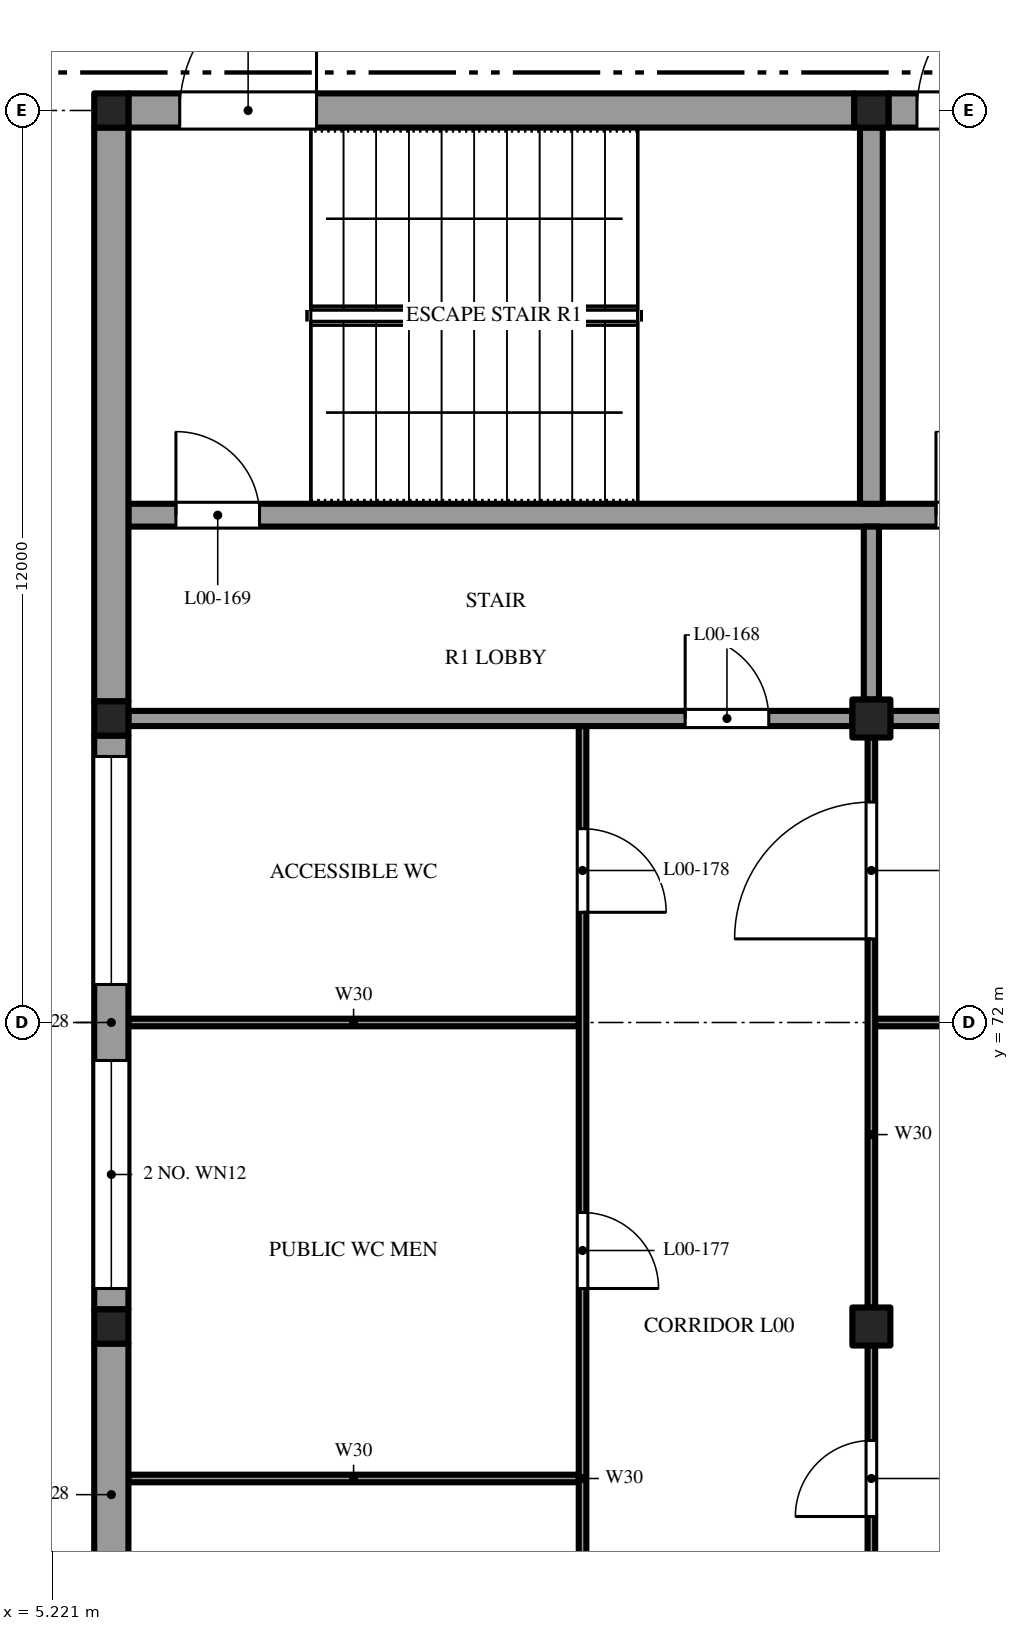
"""IFC4 building model, lengths in metres.
Left out: names, types, materials, properties, quantities, classifications, styles, units other than length and angle.
Written with IfcOpenShell. Run it as: python <this file> out.ifc"""

import sys

from ifc_helpers import new_model, si_unit, direction, frame, frame_2d, origin, origin_2d, place, context, subcontext, project, spatial, rectangle, extrude, element, fill, save


model = new_model("IFC4")
c1 = context("Model", 3, precision=1e-05, world=origin(), true_north=direction((0.0, 1.0)))
c2 = subcontext(c1, "Body", "Model", "MODEL_VIEW")
j1 = project(units=[si_unit("LENGTHUNIT", "METRE"), si_unit("PLANEANGLEUNIT", "RADIAN")], contexts=[c1])
p1 = place(None, origin())
s1 = spatial("IfcSite", under=j1, at=p1, CompositionType="ELEMENT")
p2 = place(p1, origin())
s2 = spatial("IfcBuilding", under=s1, at=p2, CompositionType="ELEMENT")
p3 = place(p2, origin())
s3 = spatial("IfcBuildingStorey", under=s2, at=p3, CompositionType="ELEMENT", Elevation=0.0)
for number, where, z_axis, x_axis in (
    (1, (6.0, 68.0, -0.4), (0.0, 0.0, 1.0), (1.0, 0.0, 0.0)),
    (2, (6.0, 76.0, -0.4), (0.0, 0.0, 1.0), (1.0, 0.0, 0.0)),
    (3, (6.0, 84.0, -0.4), (0.0, 0.0, 1.0), (1.0, 0.0, 0.0)),
):
    element("IfcColumn", number, at=place(p3, frame(where, z_axis=z_axis, x_axis=x_axis)), inside=s3, PredefinedType="COLUMN", context=c2, shape_type="SweptSolid", body=[
        extrude(rectangle(XDim=0.45, YDim=0.45, at=origin_2d()), origin(), (0.0, 0.0, 1.0), 7.6),
    ])
for number, where, z_axis, x_axis in (
    (4, (16.0, 68.0, -0.4), (0.0, 0.0, 1.0), (1.0, 0.0, 0.0)),
    (5, (16.0, 76.0, -0.4), (0.0, 0.0, 1.0), (1.0, 0.0, 0.0)),
):
    element("IfcColumn", number, at=place(p3, frame(where, z_axis=z_axis, x_axis=x_axis)), inside=s3, PredefinedType="COLUMN", context=c2, shape_type="SweptSolid", body=[
        extrude(rectangle(XDim=0.5, YDim=0.5, at=origin_2d()), origin(), (0.0, 0.0, 1.0), 7.6),
    ])
p4 = place(p3, frame((16.0, 84.0, -0.4), z_axis=(0.0, 0.0, 1.0), x_axis=(1.0, 0.0, 0.0)))
e6 = element("IfcColumn", 6, at=p4, inside=s3, PredefinedType="COLUMN", context=c2, shape_type="SweptSolid", body=[
    extrude(rectangle(XDim=0.45, YDim=0.45, at=origin_2d()), origin(), (0.0, 0.0, 1.0), 7.6),
])
for number, where, z_axis, x_axis in (
    (7, (6.225, 66.0, 0.0), (0.0, 0.0, 1.0), (1.0, 0.0, 0.0)),
    (8, (6.225, 72.0, 0.0), (0.0, 0.0, 1.0), (1.0, 0.0, 0.0)),
):
    element("IfcWall", number, at=place(p3, frame(where, z_axis=z_axis, x_axis=x_axis)), inside=s3, PredefinedType="PARTITIONING", context=c2, shape_type="SweptSolid", body=[
        extrude(rectangle(XDim=5.925, YDim=0.1, at=frame_2d((2.962, 0.0))), origin(), (0.0, 0.0, 1.0), 6.85),
    ])
p5 = place(p3, frame((16.05, 72.0, 0.0), z_axis=(0.0, 0.0, 1.0), x_axis=(1.0, 0.0, 0.0)))
e9 = element("IfcWall", 9, at=p5, inside=s3, PredefinedType="PARTITIONING", context=c2, shape_type="SweptSolid", body=[
    extrude(rectangle(XDim=29.725, YDim=0.1, at=frame_2d((14.862, 0.0))), origin(), (0.0, 0.0, 1.0), 6.85),
])
p6 = place(p5, frame((4.35, 0.0, 0.0)))
e10 = element("IfcOpeningElement", 10, at=p6, cuts=e9, PredefinedType="OPENING", context=c2, shape_type="SweptSolid", body=[
    extrude(rectangle(XDim=1.2, YDim=2.1, at=frame_2d((0.6, 1.05))), frame((0.0, 0.06, 0.0), z_axis=(0.0, -1.0, 0.0), x_axis=(1.0, 0.0, 0.0)), (0.0, 0.0, 1.0), 0.12),
])
p7 = place(p5, frame((17.55, 0.0, 0.0)))
e11 = element("IfcOpeningElement", 11, at=p7, cuts=e9, PredefinedType="OPENING", context=c2, shape_type="SweptSolid", body=[
    extrude(rectangle(XDim=1.8, YDim=2.1, at=frame_2d((0.9, 1.05))), frame((0.0, 0.06, 0.0), z_axis=(0.0, -1.0, 0.0), x_axis=(1.0, 0.0, 0.0)), (0.0, 0.0, 1.0), 0.12),
])
p8 = place(p3, frame((6.225, 76.0, 0.0), z_axis=(0.0, 0.0, 1.0), x_axis=(1.0, 0.0, 0.0)))
e12 = element("IfcWall", 12, at=p8, inside=s3, PredefinedType="SOLIDWALL", context=c2, shape_type="SweptSolid", body=[
    extrude(rectangle(XDim=9.525, YDim=0.2, at=frame_2d((4.762, 0.0))), origin(), (0.0, 0.0, 1.0), 6.85),
])
p9 = place(p8, frame((7.325, 0.0, 0.0)))
e13 = element("IfcOpeningElement", 13, at=p9, cuts=e12, PredefinedType="OPENING", context=c2, shape_type="SweptSolid", body=[
    extrude(rectangle(XDim=1.1, YDim=2.1, at=frame_2d((0.55, 1.05))), frame((0.0, 0.11, 0.0), z_axis=(0.0, -1.0, 0.0), x_axis=(1.0, 0.0, 0.0)), (0.0, 0.0, 1.0), 0.22),
])
p10 = place(p3, frame((16.25, 76.0, 0.0), z_axis=(0.0, 0.0, 1.0), x_axis=(1.0, 0.0, 0.0)))
e14 = element("IfcWall", 14, at=p10, inside=s3, PredefinedType="SOLIDWALL", context=c2, shape_type="SweptSolid", body=[
    extrude(rectangle(XDim=9.5, YDim=0.2, at=frame_2d((4.75, 0.0))), origin(), (0.0, 0.0, 1.0), 6.85),
])
p11 = place(p10, frame((4.2, 0.0, 0.0)))
e15 = element("IfcOpeningElement", 15, at=p11, cuts=e14, PredefinedType="OPENING", context=c2, shape_type="SweptSolid", body=[
    extrude(rectangle(XDim=1.1, YDim=2.1, at=frame_2d((0.55, 1.05))), frame((0.0, 0.11, 0.0), z_axis=(0.0, -1.0, 0.0), x_axis=(1.0, 0.0, 0.0)), (0.0, 0.0, 1.0), 0.22),
])
p12 = place(p3, frame((6.225, 78.675, 0.0), z_axis=(0.0, 0.0, 1.0), x_axis=(1.0, 0.0, 0.0)))
e16 = element("IfcWall", 16, at=p12, inside=s3, PredefinedType="SHEAR", context=c2, shape_type="SweptSolid", body=[
    extrude(rectangle(XDim=19.775, YDim=0.3, at=frame_2d((9.887, 0.0))), origin(), (0.0, 0.0, 1.0), 6.85),
])
p13 = place(p12, frame((0.625, 0.0, 0.0)))
e17 = element("IfcOpeningElement", 17, at=p13, cuts=e16, PredefinedType="OPENING", context=c2, shape_type="SweptSolid", body=[
    extrude(rectangle(XDim=1.1, YDim=2.1, at=frame_2d((0.55, 1.05))), frame((0.0, 0.16, 0.0), z_axis=(0.0, -1.0, 0.0), x_axis=(1.0, 0.0, 0.0)), (0.0, 0.0, 1.0), 0.32),
])
p14 = place(p12, frame((10.625, 0.0, 0.0)))
e18 = element("IfcOpeningElement", 18, at=p14, cuts=e16, PredefinedType="OPENING", context=c2, shape_type="SweptSolid", body=[
    extrude(rectangle(XDim=1.1, YDim=2.1, at=frame_2d((0.55, 1.05))), frame((0.0, 0.16, 0.0), z_axis=(0.0, -1.0, 0.0), x_axis=(1.0, 0.0, 0.0)), (0.0, 0.0, 1.0), 0.32),
])
p15 = place(p3, frame((15.775, 84.0, 0.0), z_axis=(0.0, 0.0, 1.0), x_axis=(-1.0, 0.0, 0.0)))
e19 = element("IfcWall", 19, at=p15, inside=s3, PredefinedType="SOLIDWALL", context=c2, shape_type="SweptSolid", body=[
    extrude(rectangle(XDim=9.55, YDim=0.45, at=frame_2d((4.775, 0.0))), origin(), (0.0, 0.0, 1.0), 6.85),
])
p16 = place(p15, frame((7.075, 0.0, 0.0)))
e20 = element("IfcOpeningElement", 20, at=p16, cuts=e19, PredefinedType="OPENING", context=c2, shape_type="SweptSolid", body=[
    extrude(rectangle(XDim=1.8, YDim=2.1, at=frame_2d((0.9, 1.05))), frame((0.0, 0.235, 0.0), z_axis=(0.0, -1.0, 0.0), x_axis=(1.0, 0.0, 0.0)), (0.0, 0.0, 1.0), 0.47),
])
p17 = place(p3, frame((25.775, 84.0, 0.0), z_axis=(0.0, 0.0, 1.0), x_axis=(-1.0, 0.0, 0.0)))
e21 = element("IfcWall", 21, at=p17, inside=s3, PredefinedType="SOLIDWALL", context=c2, shape_type="SweptSolid", body=[
    extrude(rectangle(XDim=9.55, YDim=0.45, at=frame_2d((4.775, 0.0))), origin(), (0.0, 0.0, 1.0), 6.85),
])
p18 = place(p17, frame((7.375, 0.0, 0.0)))
e22 = element("IfcOpeningElement", 22, at=p18, cuts=e21, PredefinedType="OPENING", context=c2, shape_type="SweptSolid", body=[
    extrude(rectangle(XDim=1.8, YDim=2.1, at=frame_2d((0.9, 1.05))), frame((0.0, 0.235, 0.0), z_axis=(0.0, -1.0, 0.0), x_axis=(1.0, 0.0, 0.0)), (0.0, 0.0, 1.0), 0.47),
])
p19 = place(p3, frame((6.0, 67.775, 0.0), z_axis=(0.0, 0.0, 1.0), x_axis=(0.0, -1.0, 0.0)))
e23 = element("IfcWall", 23, at=p19, inside=s3, PredefinedType="SOLIDWALL", context=c2, shape_type="SweptSolid", body=[
    extrude(rectangle(XDim=7.55, YDim=0.45, at=frame_2d((3.775, 0.0))), origin(), (0.0, 0.0, 1.0), 6.85),
])
p20 = place(p19, frame((4.275, 0.0, 1.0)))
e24 = element("IfcOpeningElement", 24, at=p20, cuts=e23, PredefinedType="OPENING", context=c2, shape_type="SweptSolid", body=[
    extrude(rectangle(XDim=3.0, YDim=4.0, at=frame_2d((1.5, 2.0))), frame((0.0, 0.235, 0.0), z_axis=(0.0, -1.0, 0.0), x_axis=(1.0, 0.0, 0.0)), (0.0, 0.0, 1.0), 0.47),
])
p21 = place(p3, frame((6.0, 75.775, 0.0), z_axis=(0.0, 0.0, 1.0), x_axis=(0.0, -1.0, 0.0)))
e25 = element("IfcWall", 25, at=p21, inside=s3, PredefinedType="SOLIDWALL", context=c2, shape_type="SweptSolid", body=[
    extrude(rectangle(XDim=7.55, YDim=0.45, at=frame_2d((3.775, 0.0))), origin(), (0.0, 0.0, 1.0), 6.85),
])
p22 = place(p21, frame((4.275, 0.0, 1.0)))
e26 = element("IfcOpeningElement", 26, at=p22, cuts=e25, PredefinedType="OPENING", context=c2, shape_type="SweptSolid", body=[
    extrude(rectangle(XDim=3.0, YDim=4.0, at=frame_2d((1.5, 2.0))), frame((0.0, 0.235, 0.0), z_axis=(0.0, -1.0, 0.0), x_axis=(1.0, 0.0, 0.0)), (0.0, 0.0, 1.0), 0.47),
])
p23 = place(p21, frame((0.275, 0.0, 1.0)))
e27 = element("IfcOpeningElement", 27, at=p23, cuts=e25, PredefinedType="OPENING", context=c2, shape_type="SweptSolid", body=[
    extrude(rectangle(XDim=3.0, YDim=4.0, at=frame_2d((1.5, 2.0))), frame((0.0, 0.235, 0.0), z_axis=(0.0, -1.0, 0.0), x_axis=(1.0, 0.0, 0.0)), (0.0, 0.0, 1.0), 0.47),
])
p24 = place(p3, frame((6.0, 83.775, 0.0), z_axis=(0.0, 0.0, 1.0), x_axis=(0.0, -1.0, 0.0)))
e28 = element("IfcWall", 28, at=p24, inside=s3, PredefinedType="SOLIDWALL", context=c2, shape_type="SweptSolid", body=[
    extrude(rectangle(XDim=7.55, YDim=0.45, at=frame_2d((3.775, 0.0))), origin(), (0.0, 0.0, 1.0), 6.85),
])
p25 = place(p3, frame((12.2, 60.1, 0.0), z_axis=(0.0, 0.0, 1.0), x_axis=(0.0, 1.0, 0.0)))
e29 = element("IfcWall", 29, at=p25, inside=s3, PredefinedType="PARTITIONING", context=c2, shape_type="SweptSolid", body=[
    extrude(rectangle(XDim=15.8, YDim=0.1, at=frame_2d((7.9, 0.0))), origin(), (0.0, 0.0, 1.0), 6.85),
])
p26 = place(p25, frame((2.4, 0.0, 0.0)))
e30 = element("IfcOpeningElement", 30, at=p26, cuts=e29, PredefinedType="OPENING", context=c2, shape_type="SweptSolid", body=[
    extrude(rectangle(XDim=1.0, YDim=2.1, at=frame_2d((0.5, 1.05))), frame((0.0, 0.06, 0.0), z_axis=(0.0, -1.0, 0.0), x_axis=(1.0, 0.0, 0.0)), (0.0, 0.0, 1.0), 0.12),
])
p27 = place(p25, frame((8.4, 0.0, 0.0)))
e31 = element("IfcOpeningElement", 31, at=p27, cuts=e29, PredefinedType="OPENING", context=c2, shape_type="SweptSolid", body=[
    extrude(rectangle(XDim=1.0, YDim=2.1, at=frame_2d((0.5, 1.05))), frame((0.0, 0.06, 0.0), z_axis=(0.0, -1.0, 0.0), x_axis=(1.0, 0.0, 0.0)), (0.0, 0.0, 1.0), 0.12),
])
p28 = place(p25, frame((13.35, 0.0, 0.0)))
e32 = element("IfcOpeningElement", 32, at=p28, cuts=e29, PredefinedType="OPENING", context=c2, shape_type="SweptSolid", body=[
    extrude(rectangle(XDim=1.1, YDim=2.1, at=frame_2d((0.55, 1.05))), frame((0.0, 0.06, 0.0), z_axis=(0.0, -1.0, 0.0), x_axis=(1.0, 0.0, 0.0)), (0.0, 0.0, 1.0), 0.12),
])
p29 = place(p3, frame((16.0, 60.25, 0.0), z_axis=(0.0, 0.0, 1.0), x_axis=(0.0, 1.0, 0.0)))
e33 = element("IfcWall", 33, at=p29, inside=s3, PredefinedType="PARTITIONING", context=c2, shape_type="SweptSolid", body=[
    extrude(rectangle(XDim=7.5, YDim=0.1, at=frame_2d((3.75, 0.0))), origin(), (0.0, 0.0, 1.0), 6.85),
])
p30 = place(p29, frame((5.25, 0.0, 0.0)))
e34 = element("IfcOpeningElement", 34, at=p30, cuts=e33, PredefinedType="OPENING", context=c2, shape_type="SweptSolid", body=[
    extrude(rectangle(XDim=1.0, YDim=2.1, at=frame_2d((0.5, 1.05))), frame((0.0, 0.06, 0.0), z_axis=(0.0, -1.0, 0.0), x_axis=(1.0, 0.0, 0.0)), (0.0, 0.0, 1.0), 0.12),
])
p31 = place(p3, frame((16.0, 68.25, 0.0), z_axis=(0.0, 0.0, 1.0), x_axis=(0.0, 1.0, 0.0)))
e35 = element("IfcWall", 35, at=p31, inside=s3, PredefinedType="PARTITIONING", context=c2, shape_type="SweptSolid", body=[
    extrude(rectangle(XDim=7.5, YDim=0.1, at=frame_2d((3.75, 0.0))), origin(), (0.0, 0.0, 1.0), 6.85),
])
p32 = place(p31, frame((4.85, 0.0, 0.0)))
e36 = element("IfcOpeningElement", 36, at=p32, cuts=e35, PredefinedType="OPENING", context=c2, shape_type="SweptSolid", body=[
    extrude(rectangle(XDim=1.8, YDim=2.1, at=frame_2d((0.9, 1.05))), frame((0.0, 0.06, 0.0), z_axis=(0.0, -1.0, 0.0), x_axis=(1.0, 0.0, 0.0)), (0.0, 0.0, 1.0), 0.12),
])
p33 = place(p3, frame((16.0, 76.25, 0.0), z_axis=(0.0, 0.0, 1.0), x_axis=(0.0, 1.0, 0.0)))
e37 = element("IfcWall", 37, at=p33, inside=s3, PredefinedType="SOLIDWALL", context=c2, shape_type="SweptSolid", body=[
    extrude(rectangle(XDim=2.275, YDim=0.2, at=frame_2d((1.137, 0.0))), origin(), (0.0, 0.0, 1.0), 6.85),
])
p34 = place(p3, frame((16.0, 78.825, 0.0), z_axis=(0.0, 0.0, 1.0), x_axis=(0.0, 1.0, 0.0)))
e38 = element("IfcWall", 38, at=p34, inside=s3, PredefinedType="SHEAR", context=c2, shape_type="SweptSolid", body=[
    extrude(rectangle(XDim=4.95, YDim=0.3, at=frame_2d((2.475, 0.0))), origin(), (0.0, 0.0, 1.0), 6.85),
])
p35 = place(p9, origin())
e39 = element("IfcDoor", 39, at=p35, inside=s3, OperationType="SINGLE_SWING_LEFT", PredefinedType="DOOR", context=c2, shape_type="SweptSolid", body=[
    extrude(rectangle(XDim=1.1, YDim=2.1, at=frame_2d((0.55, 1.05))), frame((0.0, 0.025, 0.0), z_axis=(0.0, -1.0, 0.0), x_axis=(1.0, 0.0, 0.0)), (0.0, 0.0, 1.0), 0.05),
])
fill(e13, e39)
p36 = place(p13, origin())
e40 = element("IfcDoor", 40, at=p36, inside=s3, OperationType="SINGLE_SWING_RIGHT", PredefinedType="DOOR", context=c2, shape_type="SweptSolid", body=[
    extrude(rectangle(XDim=1.1, YDim=2.1, at=frame_2d((0.55, 1.05))), frame((0.0, 0.025, 0.0), z_axis=(0.0, -1.0, 0.0), x_axis=(1.0, 0.0, 0.0)), (0.0, 0.0, 1.0), 0.05),
])
fill(e17, e40)
p37 = place(p14, origin())
e41 = element("IfcDoor", 41, at=p37, inside=s3, OperationType="SINGLE_SWING_RIGHT", PredefinedType="DOOR", context=c2, shape_type="SweptSolid", body=[
    extrude(rectangle(XDim=1.1, YDim=2.1, at=frame_2d((0.55, 1.05))), frame((0.0, 0.025, 0.0), z_axis=(0.0, -1.0, 0.0), x_axis=(1.0, 0.0, 0.0)), (0.0, 0.0, 1.0), 0.05),
])
fill(e18, e41)
p38 = place(p27, frame((1.0, 0.0, 0.0), z_axis=(0.0, 0.0, 1.0), x_axis=(-1.0, 0.0, 0.0)))
e42 = element("IfcDoor", 42, at=p38, inside=s3, OperationType="SINGLE_SWING_LEFT", PredefinedType="DOOR", context=c2, shape_type="SweptSolid", body=[
    extrude(rectangle(XDim=1.0, YDim=2.1, at=frame_2d((0.5, 1.05))), frame((0.0, 0.025, 0.0), z_axis=(0.0, -1.0, 0.0), x_axis=(1.0, 0.0, 0.0)), (0.0, 0.0, 1.0), 0.05),
])
fill(e31, e42)
p39 = place(p28, frame((1.1, 0.0, 0.0), z_axis=(0.0, 0.0, 1.0), x_axis=(-1.0, 0.0, 0.0)))
e43 = element("IfcDoor", 43, at=p39, inside=s3, OperationType="SINGLE_SWING_RIGHT", PredefinedType="DOOR", context=c2, shape_type="SweptSolid", body=[
    extrude(rectangle(XDim=1.1, YDim=2.1, at=frame_2d((0.55, 1.05))), frame((0.0, 0.025, 0.0), z_axis=(0.0, -1.0, 0.0), x_axis=(1.0, 0.0, 0.0)), (0.0, 0.0, 1.0), 0.05),
])
fill(e32, e43)
p40 = place(p30, origin())
e44 = element("IfcDoor", 44, at=p40, inside=s3, OperationType="SINGLE_SWING_RIGHT", PredefinedType="DOOR", context=c2, shape_type="SweptSolid", body=[
    extrude(rectangle(XDim=1.0, YDim=2.1, at=frame_2d((0.5, 1.05))), frame((0.0, 0.025, 0.0), z_axis=(0.0, -1.0, 0.0), x_axis=(1.0, 0.0, 0.0)), (0.0, 0.0, 1.0), 0.05),
])
fill(e34, e44)
p41 = place(p32, origin())
e45 = element("IfcDoor", 45, at=p41, inside=s3, OperationType="DOUBLE_DOOR_SINGLE_SWING", PredefinedType="DOOR", context=c2, shape_type="SweptSolid", body=[
    extrude(rectangle(XDim=1.8, YDim=2.1, at=frame_2d((0.9, 1.05))), frame((0.0, 0.025, 0.0), z_axis=(0.0, -1.0, 0.0), x_axis=(1.0, 0.0, 0.0)), (0.0, 0.0, 1.0), 0.05),
])
fill(e36, e45)
p42 = place(p16, frame((1.8, 0.0, 0.0), z_axis=(0.0, 0.0, 1.0), x_axis=(-1.0, 0.0, 0.0)))
e46 = element("IfcDoor", 46, at=p42, inside=s3, OperationType="DOUBLE_DOOR_SINGLE_SWING", PredefinedType="DOOR", context=c2, shape_type="SweptSolid", body=[
    extrude(rectangle(XDim=1.8, YDim=2.1, at=frame_2d((0.9, 1.05))), frame((0.0, 0.025, 0.0), z_axis=(0.0, -1.0, 0.0), x_axis=(1.0, 0.0, 0.0)), (0.0, 0.0, 1.0), 0.05),
])
fill(e20, e46)
p43 = place(p18, frame((1.8, 0.0, 0.0), z_axis=(0.0, 0.0, 1.0), x_axis=(-1.0, 0.0, 0.0)))
e47 = element("IfcDoor", 47, at=p43, inside=s3, OperationType="DOUBLE_DOOR_SINGLE_SWING", PredefinedType="DOOR", context=c2, shape_type="SweptSolid", body=[
    extrude(rectangle(XDim=1.8, YDim=2.1, at=frame_2d((0.9, 1.05))), frame((0.0, 0.025, 0.0), z_axis=(0.0, -1.0, 0.0), x_axis=(1.0, 0.0, 0.0)), (0.0, 0.0, 1.0), 0.05),
])
fill(e22, e47)
p44 = place(p22, origin())
e48 = element("IfcWindow", 48, at=p44, inside=s3, PartitioningType="SINGLE_PANEL", PredefinedType="WINDOW", context=c2, shape_type="SweptSolid", body=[
    extrude(rectangle(XDim=3.0, YDim=4.0, at=frame_2d((1.5, 2.0))), frame((0.0, 0.215, 0.0), z_axis=(0.0, -1.0, 0.0), x_axis=(1.0, 0.0, 0.0)), (0.0, 0.0, 1.0), 0.06),
])
fill(e26, e48)
p45 = place(p23, origin())
e49 = element("IfcWindow", 49, at=p45, inside=s3, PartitioningType="SINGLE_PANEL", PredefinedType="WINDOW", context=c2, shape_type="SweptSolid", body=[
    extrude(rectangle(XDim=3.0, YDim=4.0, at=frame_2d((1.5, 2.0))), frame((0.0, 0.215, 0.0), z_axis=(0.0, -1.0, 0.0), x_axis=(1.0, 0.0, 0.0)), (0.0, 0.0, 1.0), 0.06),
])
fill(e27, e49)
save(model, sys.argv[1])
